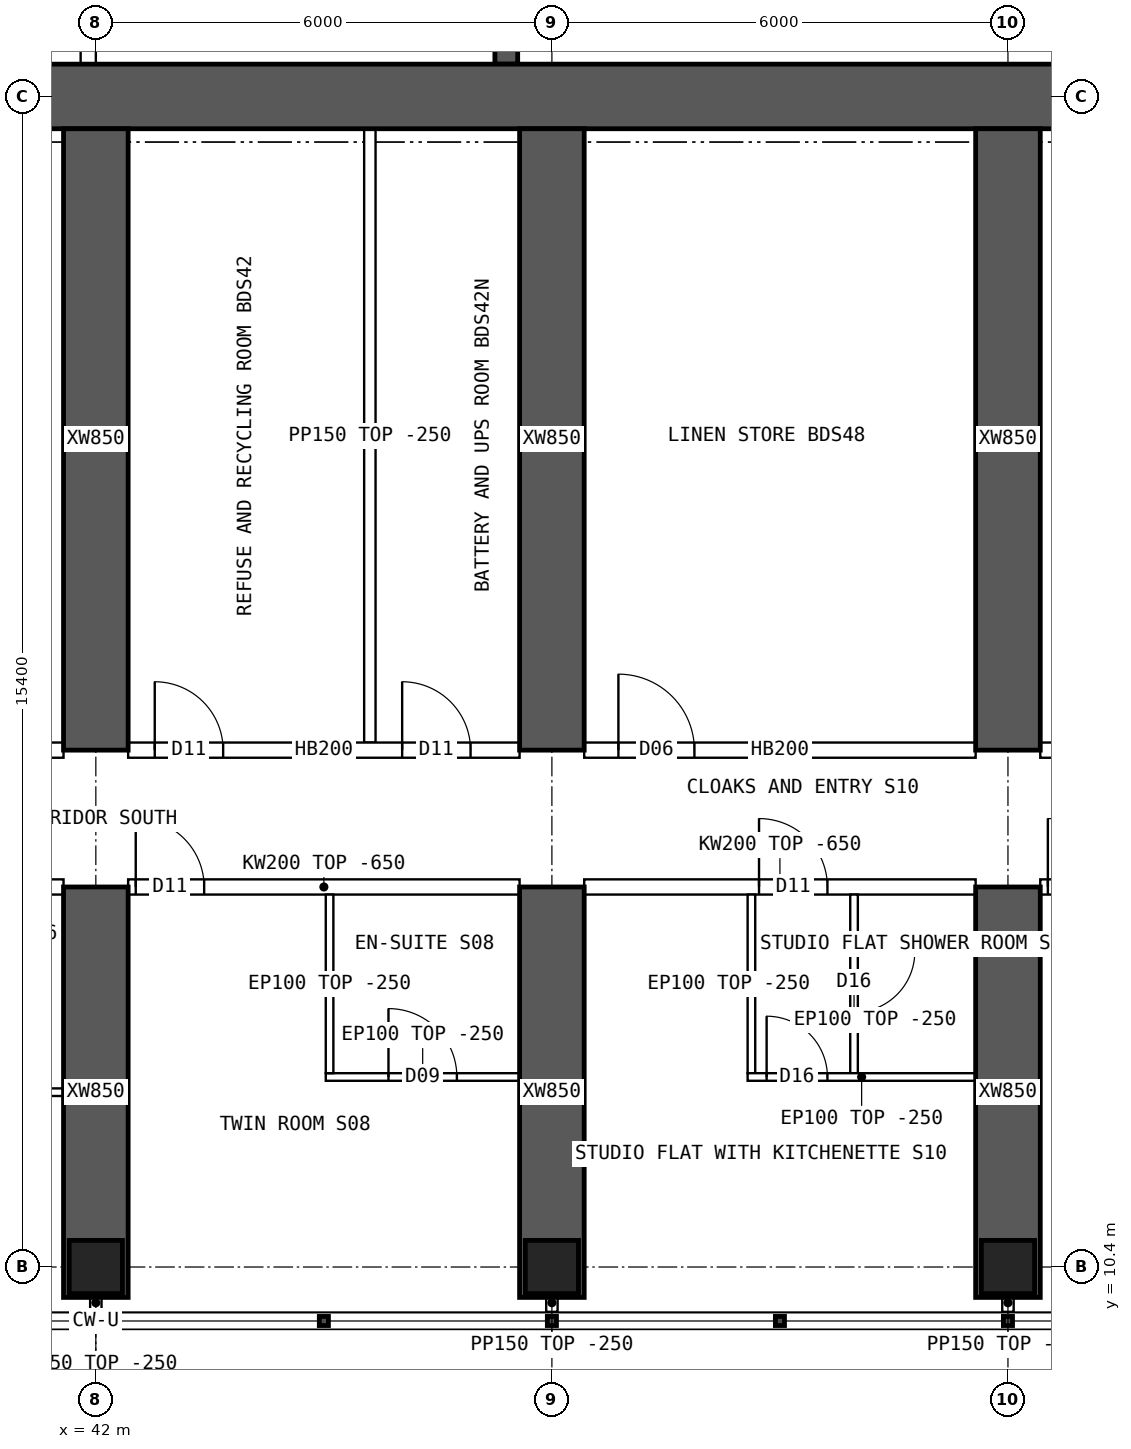
"""IFC4 building model, lengths in metres.
Left out: names, types, materials, properties, quantities, classifications, styles, units other than length and angle.
Written with IfcOpenShell. Run it as: python <this file> out.ifc"""

import sys

from ifc_helpers import new_model, si_unit, direction, frame, frame_2d, origin, origin_2d, place, context, subcontext, project, spatial, polyline, rectangle, hollow_rectangle, outline, extrude, element, fill, save


model = new_model("IFC4")
c1 = context("Model", 3, precision=1e-05, world=origin(), true_north=direction((0.0, 1.0)))
c2 = subcontext(c1, "Body", "Model", "MODEL_VIEW")
j1 = project(units=[si_unit("LENGTHUNIT", "METRE"), si_unit("PLANEANGLEUNIT", "RADIAN")], contexts=[c1])
p1 = place(None, origin())
s1 = spatial("IfcSite", under=j1, at=p1, CompositionType="ELEMENT")
p2 = place(p1, origin())
s2 = spatial("IfcBuilding", under=s1, at=p2, CompositionType="ELEMENT")
p3 = place(p2, frame((0.0, 0.0, 148.6)))
s3 = spatial("IfcBuildingStorey", under=s2, at=p3, CompositionType="ELEMENT", Elevation=148.6)
for number, where, z_axis, x_axis in (
    (1, (42.0, 10.4, 0.0), (0.0, 0.0, 1.0), (1.0, 0.0, 0.0)),
    (2, (48.0, 10.4, 0.0), (0.0, 0.0, 1.0), (1.0, 0.0, 0.0)),
    (3, (54.0, 10.4, 0.0), (0.0, 0.0, 1.0), (1.0, 0.0, 0.0)),
):
    element("IfcColumn", number, at=place(p3, frame(where, z_axis=z_axis, x_axis=x_axis)), inside=s3, PredefinedType="COLUMN", context=c2, shape_type="SweptSolid", body=[
        extrude(hollow_rectangle(XDim=0.7, YDim=0.7, WallThickness=0.07, at=origin_2d()), origin(), (0.0, 0.0, 1.0), 3.75),
    ])
p4 = place(p3, frame((18.0, 25.8, 0.0), z_axis=(0.0, 0.0, 1.0), x_axis=(1.0, 0.0, 0.0)))
e4 = element("IfcWall", 4, at=p4, inside=s3, PredefinedType="SHEAR", context=c2, shape_type="SweptSolid", body=[
    extrude(rectangle(XDim=48.0, YDim=0.85, at=frame_2d((24.0, 0.0))), origin(), (0.0, 0.0, 1.0), 3.75),
])
p5 = place(p3, frame((47.4, 26.225, 0.0), z_axis=(0.0, 0.0, 1.0), x_axis=(0.0, 1.0, 0.0)))
e5 = element("IfcWall", 5, at=p5, inside=s3, PredefinedType="SHEAR", context=c2, shape_type="SweptSolid", body=[
    extrude(rectangle(XDim=4.025, YDim=0.3, at=frame_2d((2.012, 0.0))), origin(), (0.0, 0.0, 1.0), 3.75),
])
p6 = place(p3, frame((42.0, 10.0, 0.0), z_axis=(0.0, 0.0, 1.0), x_axis=(0.0, 1.0, 0.0)))
e6 = element("IfcWall", 6, at=p6, inside=s3, PredefinedType="SHEAR", context=c2, shape_type="SweptSolid", body=[
    extrude(rectangle(XDim=5.4, YDim=0.85, at=frame_2d((2.7, 0.0))), origin(), (0.0, 0.0, 1.0), 3.75),
])
p7 = place(p3, frame((42.0, 17.2, 0.0), z_axis=(0.0, 0.0, 1.0), x_axis=(0.0, 1.0, 0.0)))
e7 = element("IfcWall", 7, at=p7, inside=s3, PredefinedType="SHEAR", context=c2, shape_type="SweptSolid", body=[
    extrude(rectangle(XDim=8.175, YDim=0.85, at=frame_2d((4.087, 0.0))), origin(), (0.0, 0.0, 1.0), 3.75),
])
p8 = place(p3, frame((48.0, 10.0, 0.0), z_axis=(0.0, 0.0, 1.0), x_axis=(0.0, 1.0, 0.0)))
e8 = element("IfcWall", 8, at=p8, inside=s3, PredefinedType="SHEAR", context=c2, shape_type="SweptSolid", body=[
    extrude(rectangle(XDim=5.4, YDim=0.85, at=frame_2d((2.7, 0.0))), origin(), (0.0, 0.0, 1.0), 3.75),
])
p9 = place(p3, frame((48.0, 17.2, 0.0), z_axis=(0.0, 0.0, 1.0), x_axis=(0.0, 1.0, 0.0)))
e9 = element("IfcWall", 9, at=p9, inside=s3, PredefinedType="SHEAR", context=c2, shape_type="SweptSolid", body=[
    extrude(rectangle(XDim=8.175, YDim=0.85, at=frame_2d((4.087, 0.0))), origin(), (0.0, 0.0, 1.0), 3.75),
])
p10 = place(p3, frame((54.0, 10.0, 0.0), z_axis=(0.0, 0.0, 1.0), x_axis=(0.0, 1.0, 0.0)))
e10 = element("IfcWall", 10, at=p10, inside=s3, PredefinedType="SHEAR", context=c2, shape_type="SweptSolid", body=[
    extrude(rectangle(XDim=5.4, YDim=0.85, at=frame_2d((2.7, 0.0))), origin(), (0.0, 0.0, 1.0), 3.75),
])
p11 = place(p3, frame((54.0, 17.2, 0.0), z_axis=(0.0, 0.0, 1.0), x_axis=(0.0, 1.0, 0.0)))
e11 = element("IfcWall", 11, at=p11, inside=s3, PredefinedType="SHEAR", context=c2, shape_type="SweptSolid", body=[
    extrude(rectangle(XDim=8.175, YDim=0.85, at=frame_2d((4.087, 0.0))), origin(), (0.0, 0.0, 1.0), 3.75),
])
p12 = place(p3, frame((41.9, 26.225, 0.0), z_axis=(0.0, 0.0, 1.0), x_axis=(0.0, 1.0, 0.0)))
e12 = element("IfcWall", 12, at=p12, inside=s3, PredefinedType="SOLIDWALL", context=c2, shape_type="SweptSolid", body=[
    extrude(rectangle(XDim=4.025, YDim=0.2, at=frame_2d((2.012, 0.0))), origin(), (0.0, 0.0, 1.0), 3.5),
])
p13 = place(p3, frame((36.425, 15.4, 0.0), z_axis=(0.0, 0.0, 1.0), x_axis=(1.0, 0.0, 0.0)))
e13 = element("IfcWall", 13, at=p13, inside=s3, PredefinedType="SOLIDWALL", context=c2, shape_type="SweptSolid", body=[
    extrude(outline(polyline([(0.0, 0.0), (5.15, 0.0), (5.15, 3.1), (0.0, 3.1), (0.0, 0.0)])), frame((0.0, 0.1, 0.0), z_axis=(0.0, -1.0, 0.0), x_axis=(1.0, 0.0, 0.0)), (0.0, 0.0, 1.0), 0.2),
])
p14 = place(p13, frame((0.3, 0.0, 0.0)))
e14 = element("IfcOpeningElement", 14, at=p14, cuts=e13, PredefinedType="OPENING", context=c2, shape_type="SweptSolid", body=[
    extrude(rectangle(XDim=1.0, YDim=2.1, at=frame_2d((0.5, 1.05))), frame((0.0, 0.11, 0.0), z_axis=(0.0, -1.0, 0.0), x_axis=(1.0, 0.0, 0.0)), (0.0, 0.0, 1.0), 0.22),
])
p15 = place(p3, frame((36.425, 17.2, 0.0), z_axis=(0.0, 0.0, 1.0), x_axis=(1.0, 0.0, 0.0)))
e15 = element("IfcWall", 15, at=p15, inside=s3, PredefinedType="SOLIDWALL", context=c2, shape_type="SweptSolid", body=[
    extrude(rectangle(XDim=5.15, YDim=0.2, at=frame_2d((2.575, 0.0))), origin(), (0.0, 0.0, 1.0), 3.5),
])
p16 = place(p15, frame((0.15, 0.0, 0.0)))
e16 = element("IfcOpeningElement", 16, at=p16, cuts=e15, PredefinedType="OPENING", context=c2, shape_type="SweptSolid", body=[
    extrude(rectangle(XDim=0.9, YDim=2.1, at=frame_2d((0.45, 1.05))), frame((0.0, 0.11, 0.0), z_axis=(0.0, -1.0, 0.0), x_axis=(1.0, 0.0, 0.0)), (0.0, 0.0, 1.0), 0.22),
])
p17 = place(p15, frame((3.625, 0.0, 0.0)))
e17 = element("IfcOpeningElement", 17, at=p17, cuts=e15, PredefinedType="OPENING", context=c2, shape_type="SweptSolid", body=[
    extrude(rectangle(XDim=0.9, YDim=2.1, at=frame_2d((0.45, 1.05))), frame((0.0, 0.11, 0.0), z_axis=(0.0, -1.0, 0.0), x_axis=(1.0, 0.0, 0.0)), (0.0, 0.0, 1.0), 0.22),
])
p18 = place(p3, frame((42.425, 15.4, 0.0), z_axis=(0.0, 0.0, 1.0), x_axis=(1.0, 0.0, 0.0)))
e18 = element("IfcWall", 18, at=p18, inside=s3, PredefinedType="SOLIDWALL", context=c2, shape_type="SweptSolid", body=[
    extrude(outline(polyline([(0.0, 0.0), (5.15, 0.0), (5.15, 3.1), (0.0, 3.1), (0.0, 0.0)])), frame((0.0, 0.1, 0.0), z_axis=(0.0, -1.0, 0.0), x_axis=(1.0, 0.0, 0.0)), (0.0, 0.0, 1.0), 0.2),
])
p19 = place(p18, frame((0.1, 0.0, 0.0)))
e19 = element("IfcOpeningElement", 19, at=p19, cuts=e18, PredefinedType="OPENING", context=c2, shape_type="SweptSolid", body=[
    extrude(rectangle(XDim=0.9, YDim=2.1, at=frame_2d((0.45, 1.05))), frame((0.0, 0.11, 0.0), z_axis=(0.0, -1.0, 0.0), x_axis=(1.0, 0.0, 0.0)), (0.0, 0.0, 1.0), 0.22),
])
p20 = place(p3, frame((42.425, 17.2, 0.0), z_axis=(0.0, 0.0, 1.0), x_axis=(1.0, 0.0, 0.0)))
e20 = element("IfcWall", 20, at=p20, inside=s3, PredefinedType="SOLIDWALL", context=c2, shape_type="SweptSolid", body=[
    extrude(rectangle(XDim=5.15, YDim=0.2, at=frame_2d((2.575, 0.0))), origin(), (0.0, 0.0, 1.0), 3.5),
])
p21 = place(p20, frame((0.35, 0.0, 0.0)))
e21 = element("IfcOpeningElement", 21, at=p21, cuts=e20, PredefinedType="OPENING", context=c2, shape_type="SweptSolid", body=[
    extrude(rectangle(XDim=0.9, YDim=2.1, at=frame_2d((0.45, 1.05))), frame((0.0, 0.11, 0.0), z_axis=(0.0, -1.0, 0.0), x_axis=(1.0, 0.0, 0.0)), (0.0, 0.0, 1.0), 0.22),
])
p22 = place(p20, frame((3.605, 0.0, 0.0)))
e22 = element("IfcOpeningElement", 22, at=p22, cuts=e20, PredefinedType="OPENING", context=c2, shape_type="SweptSolid", body=[
    extrude(rectangle(XDim=0.9, YDim=2.1, at=frame_2d((0.45, 1.05))), frame((0.0, 0.11, 0.0), z_axis=(0.0, -1.0, 0.0), x_axis=(1.0, 0.0, 0.0)), (0.0, 0.0, 1.0), 0.22),
])
p23 = place(p3, frame((48.425, 15.4, 0.0), z_axis=(0.0, 0.0, 1.0), x_axis=(1.0, 0.0, 0.0)))
e23 = element("IfcWall", 23, at=p23, inside=s3, PredefinedType="SOLIDWALL", context=c2, shape_type="SweptSolid", body=[
    extrude(outline(polyline([(0.0, 0.0), (5.15, 0.0), (5.15, 3.1), (0.0, 3.1), (0.0, 0.0)])), frame((0.0, 0.1, 0.0), z_axis=(0.0, -1.0, 0.0), x_axis=(1.0, 0.0, 0.0)), (0.0, 0.0, 1.0), 0.2),
])
p24 = place(p23, frame((2.3, 0.0, 0.0)))
e24 = element("IfcOpeningElement", 24, at=p24, cuts=e23, PredefinedType="OPENING", context=c2, shape_type="SweptSolid", body=[
    extrude(rectangle(XDim=0.9, YDim=2.1, at=frame_2d((0.45, 1.05))), frame((0.0, 0.11, 0.0), z_axis=(0.0, -1.0, 0.0), x_axis=(1.0, 0.0, 0.0)), (0.0, 0.0, 1.0), 0.22),
])
p25 = place(p3, frame((48.425, 17.2, 0.0), z_axis=(0.0, 0.0, 1.0), x_axis=(1.0, 0.0, 0.0)))
e25 = element("IfcWall", 25, at=p25, inside=s3, PredefinedType="SOLIDWALL", context=c2, shape_type="SweptSolid", body=[
    extrude(rectangle(XDim=5.15, YDim=0.2, at=frame_2d((2.575, 0.0))), origin(), (0.0, 0.0, 1.0), 3.5),
])
p26 = place(p25, frame((0.45, 0.0, 0.0)))
e26 = element("IfcOpeningElement", 26, at=p26, cuts=e25, PredefinedType="OPENING", context=c2, shape_type="SweptSolid", body=[
    extrude(rectangle(XDim=1.0, YDim=2.1, at=frame_2d((0.5, 1.05))), frame((0.0, 0.11, 0.0), z_axis=(0.0, -1.0, 0.0), x_axis=(1.0, 0.0, 0.0)), (0.0, 0.0, 1.0), 0.22),
])
p27 = place(p3, frame((54.425, 15.4, 0.0), z_axis=(0.0, 0.0, 1.0), x_axis=(1.0, 0.0, 0.0)))
e27 = element("IfcWall", 27, at=p27, inside=s3, PredefinedType="SOLIDWALL", context=c2, shape_type="SweptSolid", body=[
    extrude(outline(polyline([(0.0, 0.0), (5.15, 0.0), (5.15, 3.1), (0.0, 3.1), (0.0, 0.0)])), frame((0.0, 0.1, 0.0), z_axis=(0.0, -1.0, 0.0), x_axis=(1.0, 0.0, 0.0)), (0.0, 0.0, 1.0), 0.2),
])
p28 = place(p27, frame((0.1, 0.0, 0.0)))
e28 = element("IfcOpeningElement", 28, at=p28, cuts=e27, PredefinedType="OPENING", context=c2, shape_type="SweptSolid", body=[
    extrude(rectangle(XDim=0.9, YDim=2.1, at=frame_2d((0.45, 1.05))), frame((0.0, 0.11, 0.0), z_axis=(0.0, -1.0, 0.0), x_axis=(1.0, 0.0, 0.0)), (0.0, 0.0, 1.0), 0.22),
])
p29 = place(p3, frame((54.425, 17.2, 0.0), z_axis=(0.0, 0.0, 1.0), x_axis=(1.0, 0.0, 0.0)))
e29 = element("IfcWall", 29, at=p29, inside=s3, PredefinedType="SOLIDWALL", context=c2, shape_type="SweptSolid", body=[
    extrude(rectangle(XDim=5.15, YDim=0.2, at=frame_2d((2.575, 0.0))), origin(), (0.0, 0.0, 1.0), 3.5),
])
p30 = place(p29, frame((0.8, 0.0, 0.0)))
e30 = element("IfcOpeningElement", 30, at=p30, cuts=e29, PredefinedType="OPENING", context=c2, shape_type="SweptSolid", body=[
    extrude(rectangle(XDim=1.0, YDim=2.1, at=frame_2d((0.5, 1.05))), frame((0.0, 0.11, 0.0), z_axis=(0.0, -1.0, 0.0), x_axis=(1.0, 0.0, 0.0)), (0.0, 0.0, 1.0), 0.22),
])
p31 = place(p3, frame((38.925, 12.7, 0.0), z_axis=(0.0, 0.0, 1.0), x_axis=(1.0, 0.0, 0.0)))
e31 = element("IfcWall", 31, at=p31, inside=s3, PredefinedType="PARTITIONING", context=c2, shape_type="SweptSolid", body=[
    extrude(rectangle(XDim=2.65, YDim=0.1, at=frame_2d((1.325, 0.0))), origin(), (0.0, 0.0, 1.0), 3.5),
])
p32 = place(p3, frame((47.575, 12.9, 0.0), z_axis=(0.0, 0.0, 1.0), x_axis=(-1.0, 0.0, 0.0)))
e32 = element("IfcWall", 32, at=p32, inside=s3, PredefinedType="PARTITIONING", context=c2, shape_type="SweptSolid", body=[
    extrude(rectangle(XDim=2.55, YDim=0.1, at=frame_2d((1.275, 0.0))), origin(), (0.0, 0.0, 1.0), 3.5),
])
p33 = place(p32, frame((0.825, 0.0, 0.0)))
e33 = element("IfcOpeningElement", 33, at=p33, cuts=e32, PredefinedType="OPENING", context=c2, shape_type="SweptSolid", body=[
    extrude(rectangle(XDim=0.9, YDim=2.1, at=frame_2d((0.45, 1.05))), frame((0.0, 0.06, 0.0), z_axis=(0.0, -1.0, 0.0), x_axis=(1.0, 0.0, 0.0)), (0.0, 0.0, 1.0), 0.12),
])
p34 = place(p3, frame((45.075, 12.95, 0.0), z_axis=(0.0, 0.0, 1.0), x_axis=(0.0, 1.0, 0.0)))
e34 = element("IfcWall", 34, at=p34, inside=s3, PredefinedType="PARTITIONING", context=c2, shape_type="SweptSolid", body=[
    extrude(outline(polyline([(0.0, 0.0), (2.35, 0.0), (2.35, 3.1), (2.302, 3.1), (2.3, 3.5), (0.0, 3.5), (0.0, 0.0)])), frame((0.0, 0.05, 0.0), z_axis=(0.0, -1.0, 0.0), x_axis=(1.0, 0.0, 0.0)), (0.0, 0.0, 1.0), 0.1),
])
p35 = place(p3, frame((53.575, 12.9, 0.0), z_axis=(0.0, 0.0, 1.0), x_axis=(-1.0, 0.0, 0.0)))
e35 = element("IfcWall", 35, at=p35, inside=s3, PredefinedType="PARTITIONING", context=c2, shape_type="SweptSolid", body=[
    extrude(rectangle(XDim=3.0, YDim=0.1, at=frame_2d((1.5, 0.0))), origin(), (0.0, 0.0, 1.0), 3.5),
])
p36 = place(p35, frame((1.95, 0.0, 0.0)))
e36 = element("IfcOpeningElement", 36, at=p36, cuts=e35, PredefinedType="OPENING", context=c2, shape_type="SweptSolid", body=[
    extrude(rectangle(XDim=0.8, YDim=2.1, at=frame_2d((0.4, 1.05))), frame((0.0, 0.06, 0.0), z_axis=(0.0, -1.0, 0.0), x_axis=(1.0, 0.0, 0.0)), (0.0, 0.0, 1.0), 0.12),
])
p37 = place(p3, frame((50.625, 12.95, 0.0), z_axis=(0.0, 0.0, 1.0), x_axis=(0.0, 1.0, 0.0)))
e37 = element("IfcWall", 37, at=p37, inside=s3, PredefinedType="PARTITIONING", context=c2, shape_type="SweptSolid", body=[
    extrude(outline(polyline([(0.0, 0.0), (2.35, 0.0), (2.35, 3.1), (2.302, 3.1), (2.3, 3.5), (0.0, 3.5), (0.0, 0.0)])), frame((0.0, 0.05, 0.0), z_axis=(0.0, -1.0, 0.0), x_axis=(1.0, 0.0, 0.0)), (0.0, 0.0, 1.0), 0.1),
])
p38 = place(p3, frame((51.975, 12.95, 0.0), z_axis=(0.0, 0.0, 1.0), x_axis=(0.0, 1.0, 0.0)))
e38 = element("IfcWall", 38, at=p38, inside=s3, PredefinedType="PARTITIONING", context=c2, shape_type="SweptSolid", body=[
    extrude(outline(polyline([(0.0, 0.0), (2.35, 0.0), (2.35, 3.1), (2.302, 3.1), (2.3, 3.5), (0.0, 3.5), (0.0, 0.0)])), frame((0.0, 0.05, 0.0), z_axis=(0.0, -1.0, 0.0), x_axis=(1.0, 0.0, 0.0)), (0.0, 0.0, 1.0), 0.1),
])
p39 = place(p38, frame((0.8, 0.0, 0.0)))
e39 = element("IfcOpeningElement", 39, at=p39, cuts=e38, PredefinedType="OPENING", context=c2, shape_type="SweptSolid", body=[
    extrude(rectangle(XDim=0.8, YDim=2.1, at=frame_2d((0.4, 1.05))), frame((0.0, 0.06, 0.0), z_axis=(0.0, -1.0, 0.0), x_axis=(1.0, 0.0, 0.0)), (0.0, 0.0, 1.0), 0.12),
])
p40 = place(p3, frame((45.605, 17.3, 0.0), z_axis=(0.0, 0.0, 1.0), x_axis=(0.0, 1.0, 0.0)))
e40 = element("IfcWall", 40, at=p40, inside=s3, PredefinedType="PARTITIONING", context=c2, shape_type="SweptSolid", body=[
    extrude(rectangle(XDim=8.075, YDim=0.15, at=frame_2d((4.038, 0.0))), origin(), (0.0, 0.0, 1.0), 3.5),
])
for number, where, z_axis, x_axis in (
    (41, (42.0, 10.05, 0.0), (0.0, 0.0, 1.0), (0.0, -1.0, 0.0)),
    (42, (48.0, 10.05, 0.0), (0.0, 0.0, 1.0), (0.0, -1.0, 0.0)),
    (43, (54.0, 10.05, 0.0), (0.0, 0.0, 1.0), (0.0, -1.0, 0.0)),
):
    element("IfcWall", number, at=place(p3, frame(where, z_axis=z_axis, x_axis=x_axis)), inside=s3, PredefinedType="PARTITIONING", context=c2, shape_type="SweptSolid", body=[
        extrude(rectangle(XDim=0.24, YDim=0.15, at=frame_2d((0.12, 0.0))), origin(), (0.0, 0.0, 1.0), 3.5),
    ])
p41 = place(p33, origin())
e44 = element("IfcDoor", 44, at=p41, inside=s3, OperationType="SINGLE_SWING_RIGHT", PredefinedType="DOOR", context=c2, shape_type="SweptSolid", body=[
    extrude(rectangle(XDim=0.9, YDim=2.1, at=frame_2d((0.45, 1.05))), frame((0.0, 0.025, 0.0), z_axis=(0.0, -1.0, 0.0), x_axis=(1.0, 0.0, 0.0)), (0.0, 0.0, 1.0), 0.05),
])
fill(e33, e44)
p42 = place(p19, origin())
e45 = element("IfcDoor", 45, at=p42, inside=s3, OperationType="SINGLE_SWING_LEFT", PredefinedType="DOOR", context=c2, shape_type="SweptSolid", body=[
    extrude(rectangle(XDim=0.9, YDim=2.1, at=frame_2d((0.45, 1.05))), frame((0.0, 0.025, 0.0), z_axis=(0.0, -1.0, 0.0), x_axis=(1.0, 0.0, 0.0)), (0.0, 0.0, 1.0), 0.05),
])
fill(e19, e45)
p43 = place(p36, origin())
e46 = element("IfcDoor", 46, at=p43, inside=s3, OperationType="SINGLE_SWING_RIGHT", PredefinedType="DOOR", context=c2, shape_type="SweptSolid", body=[
    extrude(rectangle(XDim=0.8, YDim=2.1, at=frame_2d((0.4, 1.05))), frame((0.0, 0.025, 0.0), z_axis=(0.0, -1.0, 0.0), x_axis=(1.0, 0.0, 0.0)), (0.0, 0.0, 1.0), 0.05),
])
fill(e36, e46)
p44 = place(p39, origin())
e47 = element("IfcDoor", 47, at=p44, inside=s3, OperationType="SINGLE_SWING_RIGHT", PredefinedType="DOOR", context=c2, shape_type="SweptSolid", body=[
    extrude(rectangle(XDim=0.8, YDim=2.1, at=frame_2d((0.4, 1.05))), frame((0.0, 0.025, 0.0), z_axis=(0.0, -1.0, 0.0), x_axis=(1.0, 0.0, 0.0)), (0.0, 0.0, 1.0), 0.05),
])
fill(e39, e47)
p45 = place(p24, origin())
e48 = element("IfcDoor", 48, at=p45, inside=s3, OperationType="SINGLE_SWING_LEFT", PredefinedType="DOOR", context=c2, shape_type="SweptSolid", body=[
    extrude(rectangle(XDim=0.9, YDim=2.1, at=frame_2d((0.45, 1.05))), frame((0.0, 0.025, 0.0), z_axis=(0.0, -1.0, 0.0), x_axis=(1.0, 0.0, 0.0)), (0.0, 0.0, 1.0), 0.05),
])
fill(e24, e48)
p46 = place(p28, origin())
e49 = element("IfcDoor", 49, at=p46, inside=s3, OperationType="SINGLE_SWING_LEFT", PredefinedType="DOOR", context=c2, shape_type="SweptSolid", body=[
    extrude(rectangle(XDim=0.9, YDim=2.1, at=frame_2d((0.45, 1.05))), frame((0.0, 0.025, 0.0), z_axis=(0.0, -1.0, 0.0), x_axis=(1.0, 0.0, 0.0)), (0.0, 0.0, 1.0), 0.05),
])
fill(e28, e49)
p47 = place(p21, origin())
e50 = element("IfcDoor", 50, at=p47, inside=s3, OperationType="SINGLE_SWING_LEFT", PredefinedType="DOOR", context=c2, shape_type="SweptSolid", body=[
    extrude(rectangle(XDim=0.9, YDim=2.1, at=frame_2d((0.45, 1.05))), frame((0.0, 0.025, 0.0), z_axis=(0.0, -1.0, 0.0), x_axis=(1.0, 0.0, 0.0)), (0.0, 0.0, 1.0), 0.05),
])
fill(e21, e50)
p48 = place(p22, origin())
e51 = element("IfcDoor", 51, at=p48, inside=s3, OperationType="SINGLE_SWING_LEFT", PredefinedType="DOOR", context=c2, shape_type="SweptSolid", body=[
    extrude(rectangle(XDim=0.9, YDim=2.1, at=frame_2d((0.45, 1.05))), frame((0.0, 0.025, 0.0), z_axis=(0.0, -1.0, 0.0), x_axis=(1.0, 0.0, 0.0)), (0.0, 0.0, 1.0), 0.05),
])
fill(e22, e51)
p49 = place(p26, origin())
e52 = element("IfcDoor", 52, at=p49, inside=s3, OperationType="SINGLE_SWING_LEFT", PredefinedType="DOOR", context=c2, shape_type="SweptSolid", body=[
    extrude(rectangle(XDim=1.0, YDim=2.1, at=frame_2d((0.5, 1.05))), frame((0.0, 0.025, 0.0), z_axis=(0.0, -1.0, 0.0), x_axis=(1.0, 0.0, 0.0)), (0.0, 0.0, 1.0), 0.05),
])
fill(e26, e52)
save(model, sys.argv[1])
